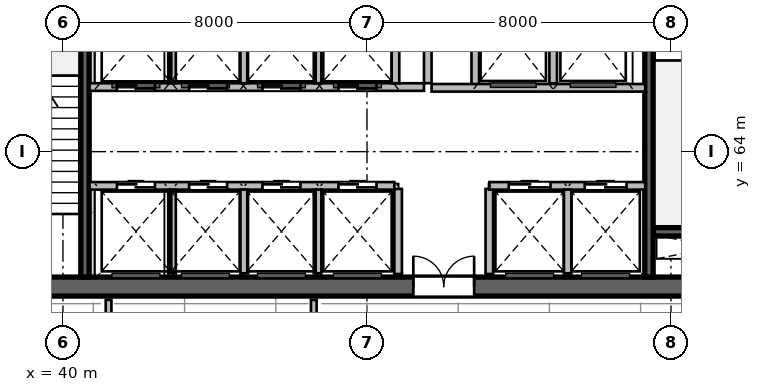
"""IFC4 building model, lengths in metres.
Left out: names, types, materials, properties, quantities, classifications, styles, units other than length and angle.
Written with IfcOpenShell. Run it as: python <this file> out.ifc"""

import sys

from ifc_helpers import new_model, si_unit, direction, frame, frame_2d, origin, place, context, subcontext, project, spatial, rectangle, extrude, source, transform, mapped, element, fill, save


model = new_model("IFC4")
c1 = context("Model", 3, precision=1e-05, world=origin(), true_north=direction((0.0, 1.0)))
c2 = subcontext(c1, "Body", "Model", "MODEL_VIEW")
j1 = project(units=[si_unit("LENGTHUNIT", "METRE"), si_unit("PLANEANGLEUNIT", "RADIAN")], contexts=[c1])
p1 = place(None, origin())
s1 = spatial("IfcSite", under=j1, at=p1, CompositionType="ELEMENT")
p2 = place(p1, origin())
s2 = spatial("IfcBuilding", under=s1, at=p2, CompositionType="ELEMENT")
p3 = place(p2, frame((0.0, 0.0, 91.2)))
s3 = spatial("IfcBuildingStorey", under=s2, at=p3, CompositionType="ELEMENT", Elevation=91.2)
m1 = source(origin(), c2, "Body", "SweptSolid", [
    extrude(rectangle(XDim=21.6, YDim=0.5, at=frame_2d((10.8, 0.0))), origin(), (0.0, 0.0, 1.0), 4.8),
])
p4 = place(p3, frame((37.2, 60.45, 0.0), z_axis=(0.0, 0.0, 1.0), x_axis=(1.0, 0.0, 0.0)))
e1 = element("IfcWall", 1, at=p4, inside=s3, PredefinedType="SHEAR", context=c2, shape_type="MappedRepresentation", body=[
    mapped(m1, transform((0.0, 0.0, 0.0), scale=1.0)),
])
p5 = place(p4, frame((1.1, 0.0, 0.0)))
e2 = element("IfcOpeningElement", 2, at=p5, cuts=e1, PredefinedType="OPENING", context=c2, shape_type="SweptSolid", body=[
    extrude(rectangle(XDim=1.15, YDim=2.15, at=frame_2d((0.575, 1.075))), frame((0.0, 0.26, 0.0), z_axis=(0.0, -1.0, 0.0), x_axis=(1.0, 0.0, 0.0)), (0.0, 0.0, 1.0), 0.52),
])
p6 = place(p4, frame((19.5, 0.0, 0.0)))
e3 = element("IfcOpeningElement", 3, at=p6, cuts=e1, PredefinedType="OPENING", context=c2, shape_type="SweptSolid", body=[
    extrude(rectangle(XDim=0.9, YDim=2.1, at=frame_2d((0.45, 1.05))), frame((0.0, 0.26, 0.0), z_axis=(0.0, -1.0, 0.0), x_axis=(1.0, 0.0, 0.0)), (0.0, 0.0, 1.0), 0.52),
])
p7 = place(p4, frame((12.02, 0.0, 0.0)))
e4 = element("IfcOpeningElement", 4, at=p7, cuts=e1, PredefinedType="OPENING", context=c2, shape_type="SweptSolid", body=[
    extrude(rectangle(XDim=1.6, YDim=2.15, at=frame_2d((0.8, 1.075))), frame((0.0, 0.26, 0.0), z_axis=(0.0, -1.0, 0.0), x_axis=(1.0, 0.0, 0.0)), (0.0, 0.0, 1.0), 0.52),
])
m2 = source(origin(), c2, "Body", "SweptSolid", [
    extrude(rectangle(XDim=3.27, YDim=0.22, at=frame_2d((1.635, 0.0))), origin(), (0.0, 0.0, 1.0), 4.8),
])
p8 = place(p3, frame((55.53, 61.89, 0.0), z_axis=(0.0, 0.0, 1.0), x_axis=(1.0, 0.0, 0.0)))
e5 = element("IfcWall", 5, at=p8, inside=s3, PredefinedType="SHEAR", context=c2, shape_type="MappedRepresentation", body=[
    mapped(m2, transform((0.0, 0.0, 0.0), scale=1.0)),
])
m3 = source(origin(), c2, "Body", "SweptSolid", [
    extrude(rectangle(XDim=11.0, YDim=0.22, at=frame_2d((5.5, 0.0))), origin(), (0.0, 0.0, 1.0), 4.8),
])
p9 = place(p3, frame((40.58, 60.7, 0.0), z_axis=(0.0, 0.0, 1.0), x_axis=(0.0, 1.0, 0.0)))
e6 = element("IfcWall", 6, at=p9, inside=s3, PredefinedType="SHEAR", context=c2, shape_type="MappedRepresentation", body=[
    mapped(m3, transform((0.0, 0.0, 0.0), scale=1.0)),
])
p10 = place(p3, frame((55.42, 60.7, 0.0), z_axis=(0.0, 0.0, 1.0), x_axis=(0.0, 1.0, 0.0)))
e7 = element("IfcWall", 7, at=p10, inside=s3, PredefinedType="SHEAR", context=c2, shape_type="MappedRepresentation", body=[
    mapped(m3, transform((0.0, 0.0, 0.0), scale=1.0)),
])
p11 = place(p10, frame((9.545, 0.0, 0.0)))
e8 = element("IfcOpeningElement", 8, at=p11, cuts=e7, PredefinedType="OPENING", context=c2, shape_type="SweptSolid", body=[
    extrude(rectangle(XDim=1.15, YDim=2.15, at=frame_2d((0.575, 1.075))), frame((0.0, 0.12, 0.0), z_axis=(0.0, -1.0, 0.0), x_axis=(1.0, 0.0, 0.0)), (0.0, 0.0, 1.0), 0.24),
])
m4 = source(origin(), c2, "Body", "SweptSolid", [
    extrude(rectangle(XDim=2.24, YDim=0.2, at=frame_2d((1.12, 0.0))), origin(), (0.0, 0.0, 1.0), 4.55),
])
for number, where, z_axis, x_axis in (
    (9, (48.82, 60.78, 0.0), (0.0, 0.0, 1.0), (0.0, 1.0, 0.0)),
    (10, (51.22, 60.78, 0.0), (0.0, 0.0, 1.0), (0.0, 1.0, 0.0)),
):
    element("IfcWall", number, at=place(p3, frame(where, z_axis=z_axis, x_axis=x_axis)), inside=s3, PredefinedType="SOLIDWALL", context=c2, shape_type="MappedRepresentation", body=[
        mapped(m4, transform((0.0, 0.0, 0.0), scale=1.0)),
    ])
m5 = source(origin(), c2, "Body", "SweptSolid", [
    extrude(rectangle(XDim=5.8, YDim=0.2, at=frame_2d((2.9, 0.0))), origin(), (0.0, 0.0, 1.0), 4.55),
])
p12 = place(p3, frame((49.6, 65.8, 0.0), z_axis=(0.0, 0.0, 1.0), x_axis=(0.0, 1.0, 0.0)))
e11 = element("IfcWall", 11, at=p12, inside=s3, PredefinedType="SOLIDWALL", context=c2, shape_type="MappedRepresentation", body=[
    mapped(m5, transform((0.0, 0.0, 0.0), scale=1.0)),
])
m6 = source(origin(), c2, "Body", "SweptSolid", [
    extrude(rectangle(XDim=2.58, YDim=0.2, at=frame_2d((1.29, 0.0))), origin(), (0.0, 0.0, 1.0), 4.55),
])
p13 = place(p3, frame((50.85, 65.68, 0.0), z_axis=(0.0, 0.0, 1.0), x_axis=(0.0, 1.0, 0.0)))
e12 = element("IfcWall", 12, at=p13, inside=s3, PredefinedType="SOLIDWALL", context=c2, shape_type="MappedRepresentation", body=[
    mapped(m6, transform((0.0, 0.0, 0.0), scale=1.0)),
])
m7 = source(origin(), c2, "Body", "SweptSolid", [
    extrude(rectangle(XDim=2.4, YDim=0.2, at=frame_2d((1.2, 0.0))), origin(), (0.0, 0.0, 1.0), 4.55),
])
p14 = place(p3, frame((52.9, 65.8, 0.0), z_axis=(0.0, 0.0, 1.0), x_axis=(0.0, 1.0, 0.0)))
e13 = element("IfcWall", 13, at=p14, inside=s3, PredefinedType="SOLIDWALL", context=c2, shape_type="MappedRepresentation", body=[
    mapped(m7, transform((0.0, 0.0, 0.0), scale=1.0)),
])
m8 = source(origin(), c2, "Body", "SweptSolid", [
    extrude(rectangle(XDim=5.62, YDim=0.2, at=frame_2d((2.81, 0.0))), origin(), (0.0, 0.0, 1.0), 4.55),
])
p15 = place(p3, frame((49.7, 65.68, 0.0), z_axis=(0.0, 0.0, 1.0), x_axis=(1.0, 0.0, 0.0)))
e14 = element("IfcWall", 14, at=p15, inside=s3, PredefinedType="SOLIDWALL", context=c2, shape_type="MappedRepresentation", body=[
    mapped(m8, transform((0.0, 0.0, 0.0), scale=1.0)),
])
m9 = source(origin(), c2, "Body", "SweptSolid", [
    extrude(rectangle(XDim=8.02, YDim=0.2, at=frame_2d((4.01, 0.0))), origin(), (0.0, 0.0, 1.0), 4.55),
])
p16 = place(p3, frame((40.7, 63.1, 0.0), z_axis=(0.0, 0.0, 1.0), x_axis=(1.0, 0.0, 0.0)))
e15 = element("IfcWall", 15, at=p16, inside=s3, PredefinedType="SOLIDWALL", context=c2, shape_type="MappedRepresentation", body=[
    mapped(m9, transform((0.0, 0.0, 0.0), scale=1.0)),
])
p17 = place(p16, frame((0.72, 0.0, 0.0)))
e16 = element("IfcOpeningElement", 16, at=p17, cuts=e15, PredefinedType="OPENING", context=c2, shape_type="SweptSolid", body=[
    extrude(rectangle(XDim=1.0, YDim=2.15, at=frame_2d((0.5, 1.075))), frame((0.0, 0.11, 0.0), z_axis=(0.0, -1.0, 0.0), x_axis=(1.0, 0.0, 0.0)), (0.0, 0.0, 1.0), 0.22),
])
p18 = place(p16, frame((2.62, 0.0, 0.0)))
e17 = element("IfcOpeningElement", 17, at=p18, cuts=e15, PredefinedType="OPENING", context=c2, shape_type="SweptSolid", body=[
    extrude(rectangle(XDim=1.0, YDim=2.15, at=frame_2d((0.5, 1.075))), frame((0.0, 0.11, 0.0), z_axis=(0.0, -1.0, 0.0), x_axis=(1.0, 0.0, 0.0)), (0.0, 0.0, 1.0), 0.22),
])
p19 = place(p16, frame((4.55, 0.0, 0.0)))
e18 = element("IfcOpeningElement", 18, at=p19, cuts=e15, PredefinedType="OPENING", context=c2, shape_type="SweptSolid", body=[
    extrude(rectangle(XDim=1.0, YDim=2.15, at=frame_2d((0.5, 1.075))), frame((0.0, 0.11, 0.0), z_axis=(0.0, -1.0, 0.0), x_axis=(1.0, 0.0, 0.0)), (0.0, 0.0, 1.0), 0.22),
])
p20 = place(p16, frame((6.55, 0.0, 0.0)))
e19 = element("IfcOpeningElement", 19, at=p20, cuts=e15, PredefinedType="OPENING", context=c2, shape_type="SweptSolid", body=[
    extrude(rectangle(XDim=1.0, YDim=2.15, at=frame_2d((0.5, 1.075))), frame((0.0, 0.11, 0.0), z_axis=(0.0, -1.0, 0.0), x_axis=(1.0, 0.0, 0.0)), (0.0, 0.0, 1.0), 0.22),
])
m10 = source(origin(), c2, "Body", "SweptSolid", [
    extrude(rectangle(XDim=4.1, YDim=0.2, at=frame_2d((2.05, 0.0))), origin(), (0.0, 0.0, 1.0), 4.55),
])
p21 = place(p3, frame((51.22, 63.1, 0.0), z_axis=(0.0, 0.0, 1.0), x_axis=(1.0, 0.0, 0.0)))
e20 = element("IfcWall", 20, at=p21, inside=s3, PredefinedType="SOLIDWALL", context=c2, shape_type="MappedRepresentation", body=[
    mapped(m10, transform((0.0, 0.0, 0.0), scale=1.0)),
])
p22 = place(p21, frame((0.51, 0.0, 0.0)))
e21 = element("IfcOpeningElement", 21, at=p22, cuts=e20, PredefinedType="OPENING", context=c2, shape_type="SweptSolid", body=[
    extrude(rectangle(XDim=1.1, YDim=2.15, at=frame_2d((0.55, 1.075))), frame((0.0, 0.11, 0.0), z_axis=(0.0, -1.0, 0.0), x_axis=(1.0, 0.0, 0.0)), (0.0, 0.0, 1.0), 0.22),
])
p23 = place(p21, frame((2.51, 0.0, 0.0)))
e22 = element("IfcOpeningElement", 22, at=p23, cuts=e20, PredefinedType="OPENING", context=c2, shape_type="SweptSolid", body=[
    extrude(rectangle(XDim=1.1, YDim=2.15, at=frame_2d((0.55, 1.075))), frame((0.0, 0.11, 0.0), z_axis=(0.0, -1.0, 0.0), x_axis=(1.0, 0.0, 0.0)), (0.0, 0.0, 1.0), 0.22),
])
m11 = source(origin(), c2, "Body", "SweptSolid", [
    extrude(rectangle(XDim=2.2, YDim=0.2, at=frame_2d((1.1, 0.0))), origin(), (0.0, 0.0, 1.0), 4.55),
])
for number, where, z_axis, x_axis in (
    (23, (42.87, 60.8, 0.0), (0.0, 0.0, 1.0), (0.0, 1.0, 0.0)),
    (24, (44.77, 60.8, 0.0), (0.0, 0.0, 1.0), (0.0, 1.0, 0.0)),
    (25, (46.7, 60.8, 0.0), (0.0, 0.0, 1.0), (0.0, 1.0, 0.0)),
    (26, (53.28, 60.8, 0.0), (0.0, 0.0, 1.0), (0.0, 1.0, 0.0)),
):
    element("IfcWall", number, at=place(p3, frame(where, z_axis=z_axis, x_axis=x_axis)), inside=s3, PredefinedType="SOLIDWALL", context=c2, shape_type="MappedRepresentation", body=[
        mapped(m11, transform((0.0, 0.0, 0.0), scale=1.0)),
    ])
m12 = source(origin(), c2, "Body", "SweptSolid", [
    extrude(rectangle(XDim=8.8, YDim=0.2, at=frame_2d((4.4, 0.0))), origin(), (0.0, 0.0, 1.0), 4.55),
])
p24 = place(p3, frame((40.7, 65.7, 0.0), z_axis=(0.0, 0.0, 1.0), x_axis=(1.0, 0.0, 0.0)))
e27 = element("IfcWall", 27, at=p24, inside=s3, PredefinedType="SOLIDWALL", context=c2, shape_type="MappedRepresentation", body=[
    mapped(m12, transform((0.0, 0.0, 0.0), scale=1.0)),
])
p25 = place(p24, frame((0.72, 0.0, 0.0)))
e28 = element("IfcOpeningElement", 28, at=p25, cuts=e27, PredefinedType="OPENING", context=c2, shape_type="SweptSolid", body=[
    extrude(rectangle(XDim=1.0, YDim=2.15, at=frame_2d((0.5, 1.075))), frame((0.0, 0.11, 0.0), z_axis=(0.0, -1.0, 0.0), x_axis=(1.0, 0.0, 0.0)), (0.0, 0.0, 1.0), 0.22),
])
p26 = place(p24, frame((2.62, 0.0, 0.0)))
e29 = element("IfcOpeningElement", 29, at=p26, cuts=e27, PredefinedType="OPENING", context=c2, shape_type="SweptSolid", body=[
    extrude(rectangle(XDim=1.0, YDim=2.15, at=frame_2d((0.5, 1.075))), frame((0.0, 0.11, 0.0), z_axis=(0.0, -1.0, 0.0), x_axis=(1.0, 0.0, 0.0)), (0.0, 0.0, 1.0), 0.22),
])
p27 = place(p24, frame((4.55, 0.0, 0.0)))
e30 = element("IfcOpeningElement", 30, at=p27, cuts=e27, PredefinedType="OPENING", context=c2, shape_type="SweptSolid", body=[
    extrude(rectangle(XDim=1.0, YDim=2.15, at=frame_2d((0.5, 1.075))), frame((0.0, 0.11, 0.0), z_axis=(0.0, -1.0, 0.0), x_axis=(1.0, 0.0, 0.0)), (0.0, 0.0, 1.0), 0.22),
])
p28 = place(p24, frame((6.55, 0.0, 0.0)))
e31 = element("IfcOpeningElement", 31, at=p28, cuts=e27, PredefinedType="OPENING", context=c2, shape_type="SweptSolid", body=[
    extrude(rectangle(XDim=1.0, YDim=2.15, at=frame_2d((0.5, 1.075))), frame((0.0, 0.11, 0.0), z_axis=(0.0, -1.0, 0.0), x_axis=(1.0, 0.0, 0.0)), (0.0, 0.0, 1.0), 0.22),
])
for number, where, z_axis, x_axis in (
    (32, (48.75, 65.8, 0.0), (0.0, 0.0, 1.0), (0.0, 1.0, 0.0)),
    (33, (42.87, 65.8, 0.0), (0.0, 0.0, 1.0), (0.0, 1.0, 0.0)),
    (34, (44.77, 65.8, 0.0), (0.0, 0.0, 1.0), (0.0, 1.0, 0.0)),
    (35, (46.7, 65.8, 0.0), (0.0, 0.0, 1.0), (0.0, 1.0, 0.0)),
):
    element("IfcWall", number, at=place(p3, frame(where, z_axis=z_axis, x_axis=x_axis)), inside=s3, PredefinedType="SOLIDWALL", context=c2, shape_type="MappedRepresentation", body=[
        mapped(m7, transform((0.0, 0.0, 0.0), scale=1.0)),
    ])
m13 = source(origin(), c2, "Body", "SweptSolid", [
    extrude(rectangle(XDim=2.033, YDim=0.15, at=frame_2d((1.016, 0.0))), origin(), (0.0, 0.0, 1.0), 4.55),
])
p29 = place(p3, frame((41.2, 58.067, 0.0), z_axis=(0.0, 0.0, 1.0), x_axis=(0.0, 1.0, 0.0)))
e36 = element("IfcWall", 36, at=p29, inside=s3, PredefinedType="PARTITIONING", context=c2, shape_type="MappedRepresentation", body=[
    mapped(m13, transform((0.0, 0.0, 0.0), scale=1.0)),
])
p30 = place(p29, frame((0.591, 0.0, 0.0)))
e37 = element("IfcOpeningElement", 37, at=p30, cuts=e36, PredefinedType="OPENING", context=c2, shape_type="SweptSolid", body=[
    extrude(rectangle(XDim=0.85, YDim=2.1, at=frame_2d((0.425, 1.05))), frame((0.0, 0.085, 0.0), z_axis=(0.0, -1.0, 0.0), x_axis=(1.0, 0.0, 0.0)), (0.0, 0.0, 1.0), 0.17),
])
p31 = place(p3, frame((46.6, 58.067, 0.0), z_axis=(0.0, 0.0, 1.0), x_axis=(0.0, 1.0, 0.0)))
e38 = element("IfcWall", 38, at=p31, inside=s3, PredefinedType="PARTITIONING", context=c2, shape_type="MappedRepresentation", body=[
    mapped(m13, transform((0.0, 0.0, 0.0), scale=1.0)),
])
m14 = source(origin(), c2, "Body", "SweptSolid", [
    extrude(rectangle(XDim=1.6, YDim=2.15, at=frame_2d((0.8, 1.075))), frame((0.0, 0.025, 0.0), z_axis=(0.0, -1.0, 0.0), x_axis=(1.0, 0.0, 0.0)), (0.0, 0.0, 1.0), 0.05),
])
p32 = place(p7, origin())
e39 = element("IfcDoor", 39, at=p32, inside=s3, OperationType="DOUBLE_DOOR_SINGLE_SWING", PredefinedType="DOOR", context=c2, shape_type="MappedRepresentation", body=[
    mapped(m14, transform((0.0, 0.0, 0.0), scale=1.0)),
])
fill(e4, e39)
m15 = source(origin(), c2, "Body", "SweptSolid", [
    extrude(rectangle(XDim=1.0, YDim=2.15, at=frame_2d((0.5, 1.075))), frame((0.0, 0.025, 0.0), z_axis=(0.0, -1.0, 0.0), x_axis=(1.0, 0.0, 0.0)), (0.0, 0.0, 1.0), 0.05),
])
p33 = place(p17, origin())
e40 = element("IfcDoor", 40, at=p33, inside=s3, OperationType="DOUBLE_DOOR_SLIDING", PredefinedType="DOOR", context=c2, shape_type="MappedRepresentation", body=[
    mapped(m15, transform((0.0, 0.0, 0.0), scale=1.0)),
])
fill(e16, e40)
p34 = place(p18, origin())
e41 = element("IfcDoor", 41, at=p34, inside=s3, OperationType="DOUBLE_DOOR_SLIDING", PredefinedType="DOOR", context=c2, shape_type="MappedRepresentation", body=[
    mapped(m15, transform((0.0, 0.0, 0.0), scale=1.0)),
])
fill(e17, e41)
p35 = place(p19, origin())
e42 = element("IfcDoor", 42, at=p35, inside=s3, OperationType="DOUBLE_DOOR_SLIDING", PredefinedType="DOOR", context=c2, shape_type="MappedRepresentation", body=[
    mapped(m15, transform((0.0, 0.0, 0.0), scale=1.0)),
])
fill(e18, e42)
p36 = place(p20, origin())
e43 = element("IfcDoor", 43, at=p36, inside=s3, OperationType="DOUBLE_DOOR_SLIDING", PredefinedType="DOOR", context=c2, shape_type="MappedRepresentation", body=[
    mapped(m15, transform((0.0, 0.0, 0.0), scale=1.0)),
])
fill(e19, e43)
m16 = source(origin(), c2, "Body", "SweptSolid", [
    extrude(rectangle(XDim=1.1, YDim=2.15, at=frame_2d((0.55, 1.075))), frame((0.0, 0.025, 0.0), z_axis=(0.0, -1.0, 0.0), x_axis=(1.0, 0.0, 0.0)), (0.0, 0.0, 1.0), 0.05),
])
p37 = place(p22, origin())
e44 = element("IfcDoor", 44, at=p37, inside=s3, OperationType="DOUBLE_DOOR_SLIDING", PredefinedType="DOOR", context=c2, shape_type="MappedRepresentation", body=[
    mapped(m16, transform((0.0, 0.0, 0.0), scale=1.0)),
])
fill(e21, e44)
p38 = place(p23, origin())
e45 = element("IfcDoor", 45, at=p38, inside=s3, OperationType="DOUBLE_DOOR_SLIDING", PredefinedType="DOOR", context=c2, shape_type="MappedRepresentation", body=[
    mapped(m16, transform((0.0, 0.0, 0.0), scale=1.0)),
])
fill(e22, e45)
p39 = place(p25, origin())
e46 = element("IfcDoor", 46, at=p39, inside=s3, OperationType="DOUBLE_DOOR_SLIDING", PredefinedType="DOOR", context=c2, shape_type="MappedRepresentation", body=[
    mapped(m15, transform((0.0, 0.0, 0.0), scale=1.0)),
])
fill(e28, e46)
p40 = place(p26, origin())
e47 = element("IfcDoor", 47, at=p40, inside=s3, OperationType="DOUBLE_DOOR_SLIDING", PredefinedType="DOOR", context=c2, shape_type="MappedRepresentation", body=[
    mapped(m15, transform((0.0, 0.0, 0.0), scale=1.0)),
])
fill(e29, e47)
p41 = place(p27, origin())
e48 = element("IfcDoor", 48, at=p41, inside=s3, OperationType="DOUBLE_DOOR_SLIDING", PredefinedType="DOOR", context=c2, shape_type="MappedRepresentation", body=[
    mapped(m15, transform((0.0, 0.0, 0.0), scale=1.0)),
])
fill(e30, e48)
p42 = place(p28, origin())
e49 = element("IfcDoor", 49, at=p42, inside=s3, OperationType="DOUBLE_DOOR_SLIDING", PredefinedType="DOOR", context=c2, shape_type="MappedRepresentation", body=[
    mapped(m15, transform((0.0, 0.0, 0.0), scale=1.0)),
])
fill(e31, e49)
save(model, sys.argv[1])
